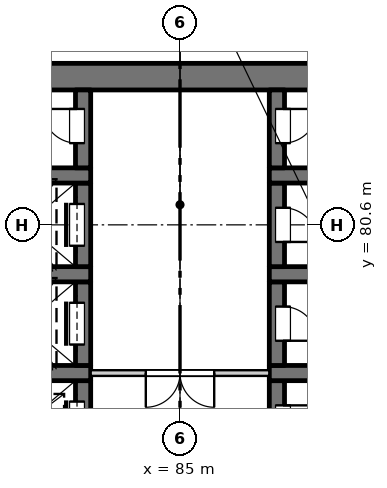
"""IFC4 building model, lengths in metres.
Left out: names, types, materials, properties, quantities, classifications, styles, units other than length and angle.
Written with IfcOpenShell. Run it as: python <this file> out.ifc"""

import sys

from ifc_helpers import new_model, si_unit, direction, frame, frame_2d, origin, place, context, subcontext, project, spatial, rectangle, extrude, element, fill, save


model = new_model("IFC4")
c1 = context("Model", 3, precision=1e-05, world=origin(), true_north=direction((0.0, 1.0)))
c2 = subcontext(c1, "Body", "Model", "MODEL_VIEW")
j1 = project(units=[si_unit("LENGTHUNIT", "METRE"), si_unit("PLANEANGLEUNIT", "RADIAN")], contexts=[c1])
p1 = place(None, origin())
s1 = spatial("IfcSite", under=j1, at=p1, CompositionType="ELEMENT")
p2 = place(p1, origin())
s2 = spatial("IfcBuilding", under=s1, at=p2, CompositionType="ELEMENT")
p3 = place(p2, frame((0.0, 0.0, 15.0)))
s3 = spatial("IfcBuildingStorey", under=s2, at=p3, CompositionType="ELEMENT", Elevation=15.0)
p4 = place(p3, frame((75.6, 84.5, -0.35), z_axis=(0.0, 0.0, 1.0), x_axis=(1.0, 0.0, 0.0)))
e1 = element("IfcWall", 1, at=p4, inside=s3, PredefinedType="SOLIDWALL", context=c2, shape_type="SweptSolid", body=[
    extrude(rectangle(XDim=18.8, YDim=0.7, at=frame_2d((9.4, 0.0))), origin(), (0.0, 0.0, 1.0), 4.6),
])
p5 = place(p3, frame((82.45, 74.3, -0.35), z_axis=(0.0, 0.0, 1.0), x_axis=(0.0, 1.0, 0.0)))
e2 = element("IfcWall", 2, at=p5, inside=s3, PredefinedType="SOLIDWALL", context=c2, shape_type="SweptSolid", body=[
    extrude(rectangle(XDim=2.2, YDim=0.4, at=frame_2d((1.1, 0.0))), origin(), (0.0, 0.0, 1.0), 4.6),
])
p6 = place(p5, frame((0.55, 0.0, 0.35)))
e3 = element("IfcOpeningElement", 3, at=p6, cuts=e2, PredefinedType="OPENING", context=c2, shape_type="SweptSolid", body=[
    extrude(rectangle(XDim=1.1, YDim=2.1, at=frame_2d((0.55, 1.05))), frame((0.0, 0.21, 0.0), z_axis=(0.0, -1.0, 0.0), x_axis=(1.0, 0.0, 0.0)), (0.0, 0.0, 1.0), 0.42),
])
p7 = place(p3, frame((79.65, 76.7, -0.35), z_axis=(0.0, 0.0, 1.0), x_axis=(1.0, 0.0, 0.0)))
e4 = element("IfcWall", 4, at=p7, inside=s3, PredefinedType="SOLIDWALL", context=c2, shape_type="SweptSolid", body=[
    extrude(rectangle(XDim=3.0, YDim=0.4, at=frame_2d((1.5, 0.0))), origin(), (0.0, 0.0, 1.0), 4.6),
])
p8 = place(p3, frame((82.45, 76.9, -0.35), z_axis=(0.0, 0.0, 1.0), x_axis=(0.0, 1.0, 0.0)))
e5 = element("IfcWall", 5, at=p8, inside=s3, PredefinedType="SOLIDWALL", context=c2, shape_type="SweptSolid", body=[
    extrude(rectangle(XDim=2.2, YDim=0.4, at=frame_2d((1.1, 0.0))), origin(), (0.0, 0.0, 1.0), 4.6),
])
p9 = place(p8, frame((0.55, 0.0, 0.35)))
e6 = element("IfcOpeningElement", 6, at=p9, cuts=e5, PredefinedType="OPENING", context=c2, shape_type="SweptSolid", body=[
    extrude(rectangle(XDim=1.1, YDim=2.1, at=frame_2d((0.55, 1.05))), frame((0.0, 0.21, 0.0), z_axis=(0.0, -1.0, 0.0), x_axis=(1.0, 0.0, 0.0)), (0.0, 0.0, 1.0), 0.42),
])
p10 = place(p3, frame((79.65, 79.3, -0.35), z_axis=(0.0, 0.0, 1.0), x_axis=(1.0, 0.0, 0.0)))
e7 = element("IfcWall", 7, at=p10, inside=s3, PredefinedType="SOLIDWALL", context=c2, shape_type="SweptSolid", body=[
    extrude(rectangle(XDim=3.0, YDim=0.4, at=frame_2d((1.5, 0.0))), origin(), (0.0, 0.0, 1.0), 4.6),
])
p11 = place(p3, frame((82.45, 79.5, -0.35), z_axis=(0.0, 0.0, 1.0), x_axis=(0.0, 1.0, 0.0)))
e8 = element("IfcWall", 8, at=p11, inside=s3, PredefinedType="SOLIDWALL", context=c2, shape_type="SweptSolid", body=[
    extrude(rectangle(XDim=2.2, YDim=0.4, at=frame_2d((1.1, 0.0))), origin(), (0.0, 0.0, 1.0), 4.6),
])
p12 = place(p11, frame((0.55, 0.0, 0.35)))
e9 = element("IfcOpeningElement", 9, at=p12, cuts=e8, PredefinedType="OPENING", context=c2, shape_type="SweptSolid", body=[
    extrude(rectangle(XDim=1.1, YDim=2.1, at=frame_2d((0.55, 1.05))), frame((0.0, 0.21, 0.0), z_axis=(0.0, -1.0, 0.0), x_axis=(1.0, 0.0, 0.0)), (0.0, 0.0, 1.0), 0.42),
])
p13 = place(p3, frame((79.65, 81.9, -0.35), z_axis=(0.0, 0.0, 1.0), x_axis=(1.0, 0.0, 0.0)))
e10 = element("IfcWall", 10, at=p13, inside=s3, PredefinedType="SOLIDWALL", context=c2, shape_type="SweptSolid", body=[
    extrude(rectangle(XDim=3.0, YDim=0.4, at=frame_2d((1.5, 0.0))), origin(), (0.0, 0.0, 1.0), 4.6),
])
p14 = place(p3, frame((82.45, 82.1, -0.35), z_axis=(0.0, 0.0, 1.0), x_axis=(0.0, 1.0, 0.0)))
e11 = element("IfcWall", 11, at=p14, inside=s3, PredefinedType="SOLIDWALL", context=c2, shape_type="SweptSolid", body=[
    extrude(rectangle(XDim=2.05, YDim=0.4, at=frame_2d((1.025, 0.0))), origin(), (0.0, 0.0, 1.0), 4.6),
])
p15 = place(p14, frame((0.65, 0.0, 0.35)))
e12 = element("IfcOpeningElement", 12, at=p15, cuts=e11, PredefinedType="OPENING", context=c2, shape_type="SweptSolid", body=[
    extrude(rectangle(XDim=0.9, YDim=2.1, at=frame_2d((0.45, 1.05))), frame((0.0, 0.21, 0.0), z_axis=(0.0, -1.0, 0.0), x_axis=(1.0, 0.0, 0.0)), (0.0, 0.0, 1.0), 0.42),
])
p16 = place(p3, frame((87.55, 74.3, -0.35), z_axis=(0.0, 0.0, 1.0), x_axis=(0.0, 1.0, 0.0)))
e13 = element("IfcWall", 13, at=p16, inside=s3, PredefinedType="SOLIDWALL", context=c2, shape_type="SweptSolid", body=[
    extrude(rectangle(XDim=2.2, YDim=0.4, at=frame_2d((1.1, 0.0))), origin(), (0.0, 0.0, 1.0), 4.6),
])
p17 = place(p16, frame((0.65, 0.0, 0.35)))
e14 = element("IfcOpeningElement", 14, at=p17, cuts=e13, PredefinedType="OPENING", context=c2, shape_type="SweptSolid", body=[
    extrude(rectangle(XDim=0.9, YDim=2.1, at=frame_2d((0.45, 1.05))), frame((0.0, 0.21, 0.0), z_axis=(0.0, -1.0, 0.0), x_axis=(1.0, 0.0, 0.0)), (0.0, 0.0, 1.0), 0.42),
])
p18 = place(p3, frame((87.35, 76.7, -0.35), z_axis=(0.0, 0.0, 1.0), x_axis=(1.0, 0.0, 0.0)))
e15 = element("IfcWall", 15, at=p18, inside=s3, PredefinedType="SOLIDWALL", context=c2, shape_type="SweptSolid", body=[
    extrude(rectangle(XDim=3.0, YDim=0.4, at=frame_2d((1.5, 0.0))), origin(), (0.0, 0.0, 1.0), 4.6),
])
p19 = place(p3, frame((87.55, 76.9, -0.35), z_axis=(0.0, 0.0, 1.0), x_axis=(0.0, 1.0, 0.0)))
e16 = element("IfcWall", 16, at=p19, inside=s3, PredefinedType="SOLIDWALL", context=c2, shape_type="SweptSolid", body=[
    extrude(rectangle(XDim=2.2, YDim=0.4, at=frame_2d((1.1, 0.0))), origin(), (0.0, 0.0, 1.0), 4.6),
])
p20 = place(p19, frame((0.65, 0.0, 0.35)))
e17 = element("IfcOpeningElement", 17, at=p20, cuts=e16, PredefinedType="OPENING", context=c2, shape_type="SweptSolid", body=[
    extrude(rectangle(XDim=0.9, YDim=2.1, at=frame_2d((0.45, 1.05))), frame((0.0, 0.21, 0.0), z_axis=(0.0, -1.0, 0.0), x_axis=(1.0, 0.0, 0.0)), (0.0, 0.0, 1.0), 0.42),
])
p21 = place(p3, frame((87.35, 79.3, -0.35), z_axis=(0.0, 0.0, 1.0), x_axis=(1.0, 0.0, 0.0)))
e18 = element("IfcWall", 18, at=p21, inside=s3, PredefinedType="SOLIDWALL", context=c2, shape_type="SweptSolid", body=[
    extrude(rectangle(XDim=3.0, YDim=0.4, at=frame_2d((1.5, 0.0))), origin(), (0.0, 0.0, 1.0), 4.6),
])
p22 = place(p3, frame((87.55, 79.5, -0.35), z_axis=(0.0, 0.0, 1.0), x_axis=(0.0, 1.0, 0.0)))
e19 = element("IfcWall", 19, at=p22, inside=s3, PredefinedType="SOLIDWALL", context=c2, shape_type="SweptSolid", body=[
    extrude(rectangle(XDim=2.2, YDim=0.4, at=frame_2d((1.1, 0.0))), origin(), (0.0, 0.0, 1.0), 4.6),
])
p23 = place(p22, frame((0.65, 0.0, 0.35)))
e20 = element("IfcOpeningElement", 20, at=p23, cuts=e19, PredefinedType="OPENING", context=c2, shape_type="SweptSolid", body=[
    extrude(rectangle(XDim=0.9, YDim=2.1, at=frame_2d((0.45, 1.05))), frame((0.0, 0.21, 0.0), z_axis=(0.0, -1.0, 0.0), x_axis=(1.0, 0.0, 0.0)), (0.0, 0.0, 1.0), 0.42),
])
p24 = place(p3, frame((87.35, 81.9, -0.35), z_axis=(0.0, 0.0, 1.0), x_axis=(1.0, 0.0, 0.0)))
e21 = element("IfcWall", 21, at=p24, inside=s3, PredefinedType="SOLIDWALL", context=c2, shape_type="SweptSolid", body=[
    extrude(rectangle(XDim=3.0, YDim=0.4, at=frame_2d((1.5, 0.0))), origin(), (0.0, 0.0, 1.0), 4.6),
])
p25 = place(p3, frame((87.55, 82.1, -0.35), z_axis=(0.0, 0.0, 1.0), x_axis=(0.0, 1.0, 0.0)))
e22 = element("IfcWall", 22, at=p25, inside=s3, PredefinedType="SOLIDWALL", context=c2, shape_type="SweptSolid", body=[
    extrude(rectangle(XDim=2.05, YDim=0.4, at=frame_2d((1.025, 0.0))), origin(), (0.0, 0.0, 1.0), 4.6),
])
p26 = place(p25, frame((0.65, 0.0, 0.35)))
e23 = element("IfcOpeningElement", 23, at=p26, cuts=e22, PredefinedType="OPENING", context=c2, shape_type="SweptSolid", body=[
    extrude(rectangle(XDim=0.9, YDim=2.1, at=frame_2d((0.45, 1.05))), frame((0.0, 0.21, 0.0), z_axis=(0.0, -1.0, 0.0), x_axis=(1.0, 0.0, 0.0)), (0.0, 0.0, 1.0), 0.42),
])
p27 = place(p3, frame((82.65, 76.7, 0.0), z_axis=(0.0, 0.0, 1.0), x_axis=(1.0, 0.0, 0.0)))
e24 = element("IfcWall", 24, at=p27, inside=s3, PredefinedType="PARTITIONING", context=c2, shape_type="SweptSolid", body=[
    extrude(rectangle(XDim=4.7, YDim=0.15, at=frame_2d((2.35, 0.0))), origin(), (0.0, 0.0, 1.0), 4.25),
])
p28 = place(p27, frame((1.45, 0.0, 0.0)))
e25 = element("IfcOpeningElement", 25, at=p28, cuts=e24, PredefinedType="OPENING", context=c2, shape_type="SweptSolid", body=[
    extrude(rectangle(XDim=1.8, YDim=2.1, at=frame_2d((0.9, 1.05))), frame((0.0, 0.085, 0.0), z_axis=(0.0, -1.0, 0.0), x_axis=(1.0, 0.0, 0.0)), (0.0, 0.0, 1.0), 0.17),
])
p29 = place(p6, origin())
e26 = element("IfcDoor", 26, at=p29, inside=s3, OperationType="SLIDING_TO_LEFT", PredefinedType="DOOR", context=c2, shape_type="SweptSolid", body=[
    extrude(rectangle(XDim=1.1, YDim=2.1, at=frame_2d((0.55, 1.05))), frame((0.0, 0.185, 0.0), z_axis=(0.0, -1.0, 0.0), x_axis=(1.0, 0.0, 0.0)), (0.0, 0.0, 1.0), 0.05),
])
fill(e3, e26)
p30 = place(p17, origin())
e27 = element("IfcDoor", 27, at=p30, inside=s3, OperationType="SINGLE_SWING_LEFT", PredefinedType="DOOR", context=c2, shape_type="SweptSolid", body=[
    extrude(rectangle(XDim=0.9, YDim=2.1, at=frame_2d((0.45, 1.05))), frame((0.0, -0.135, 0.0), z_axis=(0.0, -1.0, 0.0), x_axis=(1.0, 0.0, 0.0)), (0.0, 0.0, 1.0), 0.05),
])
fill(e14, e27)
p31 = place(p28, origin())
e28 = element("IfcDoor", 28, at=p31, inside=s3, OperationType="DOUBLE_DOOR_SINGLE_SWING", PredefinedType="DOOR", context=c2, shape_type="SweptSolid", body=[
    extrude(rectangle(XDim=1.8, YDim=2.1, at=frame_2d((0.9, 1.05))), frame((0.0, 0.025, 0.0), z_axis=(0.0, -1.0, 0.0), x_axis=(1.0, 0.0, 0.0)), (0.0, 0.0, 1.0), 0.05),
])
fill(e25, e28)
p32 = place(p9, origin())
e29 = element("IfcDoor", 29, at=p32, inside=s3, OperationType="SLIDING_TO_LEFT", PredefinedType="DOOR", context=c2, shape_type="SweptSolid", body=[
    extrude(rectangle(XDim=1.1, YDim=2.1, at=frame_2d((0.55, 1.05))), frame((0.0, 0.185, 0.0), z_axis=(0.0, -1.0, 0.0), x_axis=(1.0, 0.0, 0.0)), (0.0, 0.0, 1.0), 0.05),
])
fill(e6, e29)
p33 = place(p20, origin())
e30 = element("IfcDoor", 30, at=p33, inside=s3, OperationType="SINGLE_SWING_RIGHT", PredefinedType="DOOR", context=c2, shape_type="SweptSolid", body=[
    extrude(rectangle(XDim=0.9, YDim=2.1, at=frame_2d((0.45, 1.05))), frame((0.0, -0.135, 0.0), z_axis=(0.0, -1.0, 0.0), x_axis=(1.0, 0.0, 0.0)), (0.0, 0.0, 1.0), 0.05),
])
fill(e17, e30)
p34 = place(p12, origin())
e31 = element("IfcDoor", 31, at=p34, inside=s3, OperationType="SLIDING_TO_LEFT", PredefinedType="DOOR", context=c2, shape_type="SweptSolid", body=[
    extrude(rectangle(XDim=1.1, YDim=2.1, at=frame_2d((0.55, 1.05))), frame((0.0, 0.185, 0.0), z_axis=(0.0, -1.0, 0.0), x_axis=(1.0, 0.0, 0.0)), (0.0, 0.0, 1.0), 0.05),
])
fill(e9, e31)
p35 = place(p23, origin())
e32 = element("IfcDoor", 32, at=p35, inside=s3, OperationType="SINGLE_SWING_RIGHT", PredefinedType="DOOR", context=c2, shape_type="SweptSolid", body=[
    extrude(rectangle(XDim=0.9, YDim=2.1, at=frame_2d((0.45, 1.05))), frame((0.0, -0.135, 0.0), z_axis=(0.0, -1.0, 0.0), x_axis=(1.0, 0.0, 0.0)), (0.0, 0.0, 1.0), 0.05),
])
fill(e20, e32)
p36 = place(p15, origin())
e33 = element("IfcDoor", 33, at=p36, inside=s3, OperationType="SINGLE_SWING_RIGHT", PredefinedType="DOOR", context=c2, shape_type="SweptSolid", body=[
    extrude(rectangle(XDim=0.9, YDim=2.1, at=frame_2d((0.45, 1.05))), frame((0.0, 0.185, 0.0), z_axis=(0.0, -1.0, 0.0), x_axis=(1.0, 0.0, 0.0)), (0.0, 0.0, 1.0), 0.05),
])
fill(e12, e33)
p37 = place(p26, origin())
e34 = element("IfcDoor", 34, at=p37, inside=s3, OperationType="SINGLE_SWING_LEFT", PredefinedType="DOOR", context=c2, shape_type="SweptSolid", body=[
    extrude(rectangle(XDim=0.9, YDim=2.1, at=frame_2d((0.45, 1.05))), frame((0.0, -0.135, 0.0), z_axis=(0.0, -1.0, 0.0), x_axis=(1.0, 0.0, 0.0)), (0.0, 0.0, 1.0), 0.05),
])
fill(e23, e34)
save(model, sys.argv[1])
